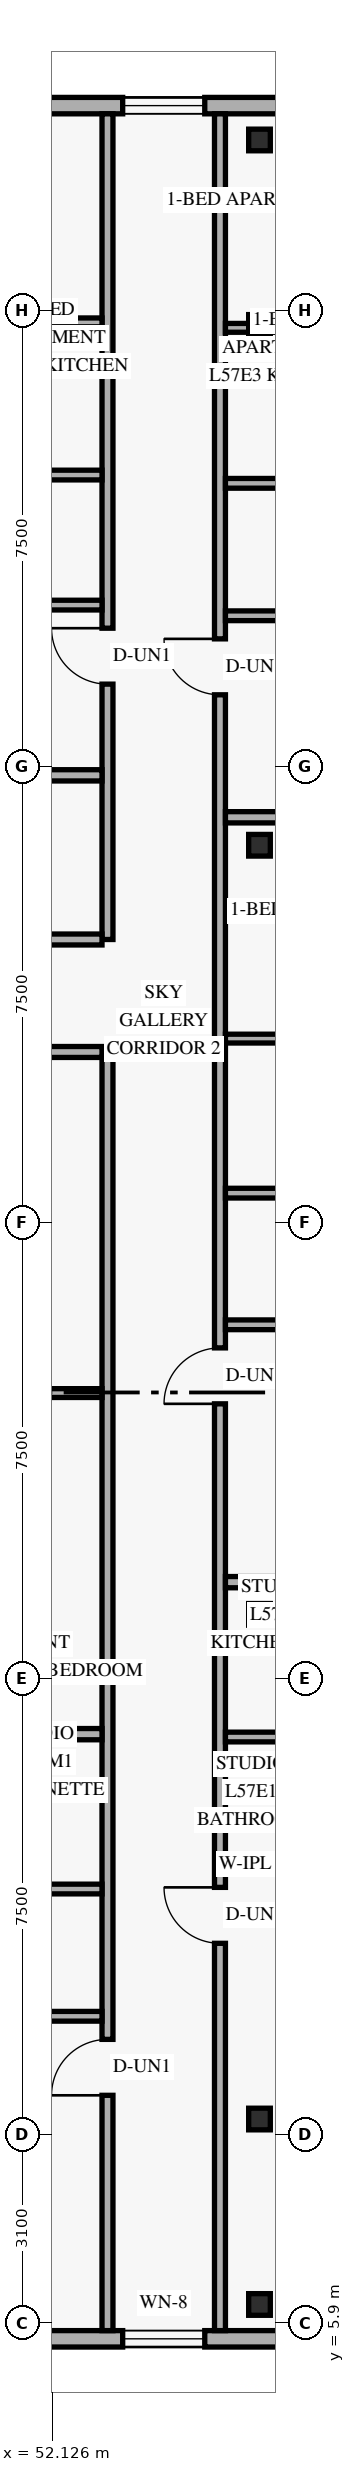
"""IFC4 building model, lengths in metres.
Left out: names, types, materials, properties, quantities, classifications, styles, units other than length and angle.
Written with IfcOpenShell. Run it as: python <this file> out.ifc"""

import sys

from ifc_helpers import new_model, si_unit, direction, frame, frame_2d, origin, origin_2d, place, context, subcontext, project, spatial, rectangle, hollow_rectangle, extrude, element, fill, save


model = new_model("IFC4")
c1 = context("Model", 3, precision=1e-05, world=origin(), true_north=direction((0.0, 1.0)))
c2 = subcontext(c1, "Body", "Model", "MODEL_VIEW")
j1 = project(units=[si_unit("LENGTHUNIT", "METRE"), si_unit("PLANEANGLEUNIT", "RADIAN")], contexts=[c1])
p1 = place(None, origin())
s1 = spatial("IfcSite", under=j1, at=p1, CompositionType="ELEMENT")
p2 = place(p1, origin())
s2 = spatial("IfcBuilding", under=s1, at=p2, CompositionType="ELEMENT")
p3 = place(p2, frame((0.0, 0.0, 220.2)))
s3 = spatial("IfcBuildingStorey", under=s2, at=p3, CompositionType="ELEMENT", Elevation=220.2)
for number, where, z_axis, x_axis in (
    (1, (55.428, 6.2, 0.0), (0.058, 0.0, 0.998), (0.0, 1.0, 0.0)),
    (2, (55.428, 9.25, 0.0), (0.058, 0.0, 0.998), (0.0, 1.0, 0.0)),
    (3, (55.428, 17.55, 0.0), (0.058, 0.0, 0.998), (0.0, 1.0, 0.0)),
    (4, (55.428, 30.2, 0.0), (0.058, 0.0, 0.998), (0.0, 1.0, 0.0)),
    (5, (55.428, 38.75, 0.0), (0.058, 0.0, 0.998), (0.0, 1.0, 0.0)),
    (6, (55.428, 41.8, 0.0), (0.058, 0.0, 0.998), (0.0, 1.0, 0.0)),
):
    element("IfcColumn", number, at=place(p3, frame(where, z_axis=z_axis, x_axis=x_axis)), inside=s3, PredefinedType="COLUMN", context=c2, shape_type="SweptSolid", body=[
        extrude(hollow_rectangle(XDim=0.356, YDim=0.356, WallThickness=0.016, at=origin_2d()), origin(), (0.0, 0.0, 1.0), 3.606),
    ])
p4 = place(p3, frame((25.82, 5.635, 0.0), z_axis=(0.0, 0.0, 1.0), x_axis=(1.0, 0.0, 0.0)))
e7 = element("IfcWall", 7, at=p4, inside=s3, PredefinedType="SOLIDWALL", context=c2, shape_type="SweptSolid", body=[
    extrude(rectangle(XDim=32.96, YDim=0.27, at=frame_2d((16.48, 0.0))), origin(), (0.0, 0.0, 1.0), 3.36),
])
p5 = place(p4, frame((3.795, 0.0, 0.85)))
e8 = element("IfcOpeningElement", 8, at=p5, cuts=e7, PredefinedType="OPENING", context=c2, shape_type="SweptSolid", body=[
    extrude(rectangle(XDim=1.35, YDim=1.55, at=frame_2d((0.675, 0.775))), frame((0.0, 0.145, 0.0), z_axis=(0.0, -1.0, 0.0), x_axis=(1.0, 0.0, 0.0)), (0.0, 0.0, 1.0), 0.29),
])
p6 = place(p4, frame((16.313, 0.0, 0.85)))
e9 = element("IfcOpeningElement", 9, at=p6, cuts=e7, PredefinedType="OPENING", context=c2, shape_type="SweptSolid", body=[
    extrude(rectangle(XDim=1.35, YDim=1.55, at=frame_2d((0.675, 0.775))), frame((0.0, 0.145, 0.0), z_axis=(0.0, -1.0, 0.0), x_axis=(1.0, 0.0, 0.0)), (0.0, 0.0, 1.0), 0.29),
])
p7 = place(p4, frame((27.463, 0.0, 0.85)))
e10 = element("IfcOpeningElement", 10, at=p7, cuts=e7, PredefinedType="OPENING", context=c2, shape_type="SweptSolid", body=[
    extrude(rectangle(XDim=1.35, YDim=1.55, at=frame_2d((0.675, 0.775))), frame((0.0, 0.145, 0.0), z_axis=(0.0, -1.0, 0.0), x_axis=(1.0, 0.0, 0.0)), (0.0, 0.0, 1.0), 0.29),
])
p8 = place(p4, frame((30.881, 0.0, 0.85)))
e11 = element("IfcOpeningElement", 11, at=p8, cuts=e7, PredefinedType="OPENING", context=c2, shape_type="SweptSolid", body=[
    extrude(rectangle(XDim=1.35, YDim=1.55, at=frame_2d((0.675, 0.775))), frame((0.0, 0.145, 0.0), z_axis=(0.0, -1.0, 0.0), x_axis=(1.0, 0.0, 0.0)), (0.0, 0.0, 1.0), 0.29),
])
p9 = place(p3, frame((58.78, 42.365, 0.0), z_axis=(0.0, 0.0, 1.0), x_axis=(-1.0, 0.0, 0.0)))
e12 = element("IfcWall", 12, at=p9, inside=s3, PredefinedType="SOLIDWALL", context=c2, shape_type="SweptSolid", body=[
    extrude(rectangle(XDim=32.96, YDim=0.27, at=frame_2d((16.48, 0.0))), origin(), (0.0, 0.0, 1.0), 3.36),
])
p10 = place(p9, frame((27.815, 0.0, 0.85)))
e13 = element("IfcOpeningElement", 13, at=p10, cuts=e12, PredefinedType="OPENING", context=c2, shape_type="SweptSolid", body=[
    extrude(rectangle(XDim=1.35, YDim=1.55, at=frame_2d((0.675, 0.775))), frame((0.0, 0.145, 0.0), z_axis=(0.0, -1.0, 0.0), x_axis=(1.0, 0.0, 0.0)), (0.0, 0.0, 1.0), 0.29),
])
p11 = place(p9, frame((15.022, 0.0, 0.85)))
e14 = element("IfcOpeningElement", 14, at=p11, cuts=e12, PredefinedType="OPENING", context=c2, shape_type="SweptSolid", body=[
    extrude(rectangle(XDim=1.35, YDim=1.55, at=frame_2d((0.675, 0.775))), frame((0.0, 0.145, 0.0), z_axis=(0.0, -1.0, 0.0), x_axis=(1.0, 0.0, 0.0)), (0.0, 0.0, 1.0), 0.29),
])
p12 = place(p9, frame((4.147, 0.0, 0.85)))
e15 = element("IfcOpeningElement", 15, at=p12, cuts=e12, PredefinedType="OPENING", context=c2, shape_type="SweptSolid", body=[
    extrude(rectangle(XDim=1.35, YDim=1.55, at=frame_2d((0.675, 0.775))), frame((0.0, 0.145, 0.0), z_axis=(0.0, -1.0, 0.0), x_axis=(1.0, 0.0, 0.0)), (0.0, 0.0, 1.0), 0.29),
])
p13 = place(p9, frame((0.729, 0.0, 0.85)))
e16 = element("IfcOpeningElement", 16, at=p13, cuts=e12, PredefinedType="OPENING", context=c2, shape_type="SweptSolid", body=[
    extrude(rectangle(XDim=1.35, YDim=1.55, at=frame_2d((0.675, 0.775))), frame((0.0, 0.145, 0.0), z_axis=(0.0, -1.0, 0.0), x_axis=(1.0, 0.0, 0.0)), (0.0, 0.0, 1.0), 0.29),
])
p14 = place(p3, frame((53.033, 5.77, 0.0), z_axis=(0.0, 0.0, 1.0), x_axis=(0.0, 1.0, 0.0)))
e17 = element("IfcWall", 17, at=p14, inside=s3, PredefinedType="STANDARD", context=c2, shape_type="SweptSolid", body=[
    extrude(rectangle(XDim=21.03, YDim=0.18, at=frame_2d((10.515, 0.0))), origin(), (0.0, 0.0, 1.0), 2.803),
])
p15 = place(p14, frame((3.87, 0.0, 0.0)))
e18 = element("IfcOpeningElement", 18, at=p15, cuts=e17, PredefinedType="OPENING", context=c2, shape_type="SweptSolid", body=[
    extrude(rectangle(XDim=0.92, YDim=2.15, at=frame_2d((0.46, 1.075))), frame((0.0, 0.1, 0.0), z_axis=(0.0, -1.0, 0.0), x_axis=(1.0, 0.0, 0.0)), (0.0, 0.0, 1.0), 0.2),
])
p16 = place(p3, frame((53.033, 28.65, 0.0), z_axis=(0.0, 0.0, 1.0), x_axis=(0.0, 1.0, 0.0)))
e19 = element("IfcWall", 19, at=p16, inside=s3, PredefinedType="STANDARD", context=c2, shape_type="SweptSolid", body=[
    extrude(rectangle(XDim=13.58, YDim=0.18, at=frame_2d((6.79, 0.0))), origin(), (0.0, 0.0, 1.0), 2.803),
])
p17 = place(p16, frame((4.2, 0.0, 0.0)))
e20 = element("IfcOpeningElement", 20, at=p17, cuts=e19, PredefinedType="OPENING", context=c2, shape_type="SweptSolid", body=[
    extrude(rectangle(XDim=0.92, YDim=2.15, at=frame_2d((0.46, 1.075))), frame((0.0, 0.1, 0.0), z_axis=(0.0, -1.0, 0.0), x_axis=(1.0, 0.0, 0.0)), (0.0, 0.0, 1.0), 0.2),
])
p18 = place(p3, frame((37.64, 26.8, 0.0), z_axis=(0.0, 0.0, 1.0), x_axis=(1.0, 0.0, 0.0)))
e21 = element("IfcWall", 21, at=p18, inside=s3, PredefinedType="STANDARD", context=c2, shape_type="SweptSolid", body=[
    extrude(rectangle(XDim=15.303, YDim=0.18, at=frame_2d((7.651, 0.0))), origin(), (0.0, 0.0, 1.0), 2.803),
])
p19 = place(p18, frame((0.32, 0.0, 0.0)))
e22 = element("IfcOpeningElement", 22, at=p19, cuts=e21, PredefinedType="OPENING", context=c2, shape_type="SweptSolid", body=[
    extrude(rectangle(XDim=0.92, YDim=2.15, at=frame_2d((0.46, 1.075))), frame((0.0, 0.1, 0.0), z_axis=(0.0, -1.0, 0.0), x_axis=(1.0, 0.0, 0.0)), (0.0, 0.0, 1.0), 0.2),
])
p20 = place(p3, frame((37.64, 28.65, 0.0), z_axis=(0.0, 0.0, 1.0), x_axis=(1.0, 0.0, 0.0)))
e23 = element("IfcWall", 23, at=p20, inside=s3, PredefinedType="STANDARD", context=c2, shape_type="SweptSolid", body=[
    extrude(rectangle(XDim=15.303, YDim=0.18, at=frame_2d((7.651, 0.0))), origin(), (0.0, 0.0, 1.0), 2.803),
])
p21 = place(p3, frame((54.883, 5.77, 0.0), z_axis=(0.0, 0.0, 1.0), x_axis=(0.0, 1.0, 0.0)))
e24 = element("IfcWall", 24, at=p21, inside=s3, PredefinedType="STANDARD", context=c2, shape_type="SweptSolid", body=[
    extrude(rectangle(XDim=36.46, YDim=0.18, at=frame_2d((18.23, 0.0))), origin(), (0.0, 0.0, 1.0), 2.803),
])
p22 = place(p21, frame((6.37, 0.0, 0.0)))
e25 = element("IfcOpeningElement", 25, at=p22, cuts=e24, PredefinedType="OPENING", context=c2, shape_type="SweptSolid", body=[
    extrude(rectangle(XDim=0.92, YDim=2.15, at=frame_2d((0.46, 1.075))), frame((0.0, 0.1, 0.0), z_axis=(0.0, -1.0, 0.0), x_axis=(1.0, 0.0, 0.0)), (0.0, 0.0, 1.0), 0.2),
])
p23 = place(p21, frame((15.243, 0.0, 0.0)))
e26 = element("IfcOpeningElement", 26, at=p23, cuts=e24, PredefinedType="OPENING", context=c2, shape_type="SweptSolid", body=[
    extrude(rectangle(XDim=0.92, YDim=2.15, at=frame_2d((0.46, 1.075))), frame((0.0, 0.1, 0.0), z_axis=(0.0, -1.0, 0.0), x_axis=(1.0, 0.0, 0.0)), (0.0, 0.0, 1.0), 0.2),
])
p24 = place(p21, frame((26.905, 0.0, 0.0)))
e27 = element("IfcOpeningElement", 27, at=p24, cuts=e24, PredefinedType="OPENING", context=c2, shape_type="SweptSolid", body=[
    extrude(rectangle(XDim=0.92, YDim=2.15, at=frame_2d((0.46, 1.075))), frame((0.0, 0.1, 0.0), z_axis=(0.0, -1.0, 0.0), x_axis=(1.0, 0.0, 0.0)), (0.0, 0.0, 1.0), 0.2),
])
p25 = place(p3, frame((54.973, 13.44, 0.0), z_axis=(0.0, 0.0, 1.0), x_axis=(1.0, 0.0, 0.0)))
e28 = element("IfcWall", 28, at=p25, inside=s3, PredefinedType="PLUMBINGWALL", context=c2, shape_type="SweptSolid", body=[
    extrude(rectangle(XDim=2.606, YDim=0.16, at=frame_2d((1.303, 0.0))), origin(), (0.0, 0.0, 1.0), 2.879),
])
p26 = place(p3, frame((54.973, 15.533, 0.0), z_axis=(0.0, 0.0, 1.0), x_axis=(1.0, 0.0, 0.0)))
e29 = element("IfcWall", 29, at=p26, inside=s3, PredefinedType="PLUMBINGWALL", context=c2, shape_type="SweptSolid", body=[
    extrude(rectangle(XDim=2.446, YDim=0.16, at=frame_2d((1.223, 0.0))), origin(), (0.0, 0.0, 1.0), 2.879),
])
p27 = place(p3, frame((54.973, 18.08, 0.0), z_axis=(0.0, 0.0, 1.0), x_axis=(1.0, 0.0, 0.0)))
e30 = element("IfcWall", 30, at=p27, inside=s3, PredefinedType="PARTITIONING", context=c2, shape_type="SweptSolid", body=[
    extrude(rectangle(XDim=7.157, YDim=0.185, at=frame_2d((3.579, 0.0))), origin(), (0.0, 0.0, 1.0), 2.879),
])
p28 = place(p3, frame((54.973, 27.02, 0.0), z_axis=(0.0, 0.0, 1.0), x_axis=(1.0, 0.0, 0.0)))
e31 = element("IfcWall", 31, at=p28, inside=s3, PredefinedType="PARTITIONING", context=c2, shape_type="SweptSolid", body=[
    extrude(rectangle(XDim=7.157, YDim=0.145, at=frame_2d((3.579, 0.0))), origin(), (0.0, 0.0, 1.0), 2.879),
])
p29 = place(p28, frame((4.594, 0.0, 0.0)))
e32 = element("IfcOpeningElement", 32, at=p29, cuts=e31, PredefinedType="OPENING", context=c2, shape_type="SweptSolid", body=[
    extrude(rectangle(XDim=0.9, YDim=2.14, at=frame_2d((0.45, 1.07))), frame((0.0, 0.083, 0.0), z_axis=(0.0, -1.0, 0.0), x_axis=(1.0, 0.0, 0.0)), (0.0, 0.0, 1.0), 0.165),
])
p30 = place(p3, frame((54.973, 22.313, 0.0), z_axis=(0.0, 0.0, 1.0), x_axis=(1.0, 0.0, 0.0)))
e33 = element("IfcWall", 33, at=p30, inside=s3, PredefinedType="PLUMBINGWALL", context=c2, shape_type="SweptSolid", body=[
    extrude(rectangle(XDim=2.712, YDim=0.16, at=frame_2d((1.356, 0.0))), origin(), (0.0, 0.0, 1.0), 2.879),
])
p31 = place(p3, frame((54.973, 24.478, 0.0), z_axis=(0.0, 0.0, 1.0), x_axis=(1.0, 0.0, 0.0)))
e34 = element("IfcWall", 34, at=p31, inside=s3, PredefinedType="PLUMBINGWALL", context=c2, shape_type="SweptSolid", body=[
    extrude(rectangle(XDim=2.552, YDim=0.16, at=frame_2d((1.276, 0.0))), origin(), (0.0, 0.0, 1.0), 2.879),
])
p32 = place(p3, frame((54.973, 30.66, 0.0), z_axis=(0.0, 0.0, 1.0), x_axis=(1.0, 0.0, 0.0)))
e35 = element("IfcWall", 35, at=p32, inside=s3, PredefinedType="PARTITIONING", context=c2, shape_type="SweptSolid", body=[
    extrude(rectangle(XDim=7.157, YDim=0.185, at=frame_2d((3.579, 0.0))), origin(), (0.0, 0.0, 1.0), 2.879),
])
p33 = place(p3, frame((54.973, 38.71, 0.0), z_axis=(0.0, 0.0, 1.0), x_axis=(1.0, 0.0, 0.0)))
e36 = element("IfcWall", 36, at=p33, inside=s3, PredefinedType="PARTITIONING", context=c2, shape_type="SweptSolid", body=[
    extrude(rectangle(XDim=7.157, YDim=0.145, at=frame_2d((3.579, 0.0))), origin(), (0.0, 0.0, 1.0), 2.803),
])
p34 = place(p33, frame((4.633, 0.0, 0.0)))
e37 = element("IfcOpeningElement", 37, at=p34, cuts=e36, PredefinedType="OPENING", context=c2, shape_type="SweptSolid", body=[
    extrude(rectangle(XDim=0.9, YDim=2.14, at=frame_2d((0.45, 1.07))), frame((0.0, 0.083, 0.0), z_axis=(0.0, -1.0, 0.0), x_axis=(1.0, 0.0, 0.0)), (0.0, 0.0, 1.0), 0.165),
])
p35 = place(p3, frame((54.973, 33.975, 0.0), z_axis=(0.0, 0.0, 1.0), x_axis=(1.0, 0.0, 0.0)))
e38 = element("IfcWall", 38, at=p35, inside=s3, PredefinedType="PLUMBINGWALL", context=c2, shape_type="SweptSolid", body=[
    extrude(rectangle(XDim=2.788, YDim=0.16, at=frame_2d((1.394, 0.0))), origin(), (0.0, 0.0, 1.0), 2.879),
])
p36 = place(p3, frame((54.973, 36.153, 0.0), z_axis=(0.0, 0.0, 1.0), x_axis=(1.0, 0.0, 0.0)))
e39 = element("IfcWall", 39, at=p36, inside=s3, PredefinedType="PLUMBINGWALL", context=c2, shape_type="SweptSolid", body=[
    extrude(rectangle(XDim=2.628, YDim=0.16, at=frame_2d((1.314, 0.0))), origin(), (0.0, 0.0, 1.0), 2.879),
])
p37 = place(p3, frame((38.423, 15.58, 0.0), z_axis=(0.0, 0.0, 1.0), x_axis=(1.0, 0.0, 0.0)))
e40 = element("IfcWall", 40, at=p37, inside=s3, PredefinedType="PARTITIONING", context=c2, shape_type="SweptSolid", body=[
    extrude(rectangle(XDim=14.52, YDim=0.185, at=frame_2d((7.26, 0.0))), origin(), (0.0, 0.0, 1.0), 2.803),
])
p38 = place(p3, frame((50.109, 10.94, 0.0), z_axis=(0.0, 0.0, 1.0), x_axis=(1.0, 0.0, 0.0)))
e41 = element("IfcWall", 41, at=p38, inside=s3, PredefinedType="PLUMBINGWALL", context=c2, shape_type="SweptSolid", body=[
    extrude(rectangle(XDim=2.834, YDim=0.16, at=frame_2d((1.417, 0.0))), origin(), (0.0, 0.0, 1.0), 3.36),
])
p39 = place(p3, frame((50.269, 13.033, 0.0), z_axis=(0.0, 0.0, 1.0), x_axis=(1.0, 0.0, 0.0)))
e42 = element("IfcWall", 42, at=p39, inside=s3, PredefinedType="PLUMBINGWALL", context=c2, shape_type="SweptSolid", body=[
    extrude(rectangle(XDim=2.674, YDim=0.16, at=frame_2d((1.337, 0.0))), origin(), (0.0, 0.0, 1.0), 3.36),
])
p40 = place(p3, frame((49.723, 21.19, 0.0), z_axis=(0.0, 0.0, 1.0), x_axis=(1.0, 0.0, 0.0)))
e43 = element("IfcWall", 43, at=p40, inside=s3, PredefinedType="PARTITIONING", context=c2, shape_type="SweptSolid", body=[
    extrude(rectangle(XDim=3.22, YDim=0.145, at=frame_2d((1.61, 0.0))), origin(), (0.0, 0.0, 1.0), 3.36),
])
p41 = place(p3, frame((38.972, 31.35, 0.0), z_axis=(0.0, 0.0, 1.0), x_axis=(1.0, 0.0, 0.0)))
e44 = element("IfcWall", 44, at=p41, inside=s3, PredefinedType="PARTITIONING", context=c2, shape_type="SweptSolid", body=[
    extrude(rectangle(XDim=13.97, YDim=0.185, at=frame_2d((6.985, 0.0))), origin(), (0.0, 0.0, 1.0), 2.803),
])
p42 = place(p3, frame((38.51, 38.8, 0.0), z_axis=(0.0, 0.0, 1.0), x_axis=(1.0, 0.0, 0.0)))
e45 = element("IfcWall", 45, at=p42, inside=s3, PredefinedType="PARTITIONING", context=c2, shape_type="SweptSolid", body=[
    extrude(rectangle(XDim=14.433, YDim=0.145, at=frame_2d((7.216, 0.0))), origin(), (0.0, 0.0, 1.0), 2.803),
])
p43 = place(p42, frame((7.273, 0.0, 0.0)))
e46 = element("IfcOpeningElement", 46, at=p43, cuts=e45, PredefinedType="OPENING", context=c2, shape_type="SweptSolid", body=[
    extrude(rectangle(XDim=0.9, YDim=2.14, at=frame_2d((0.45, 1.07))), frame((0.0, 0.083, 0.0), z_axis=(0.0, -1.0, 0.0), x_axis=(1.0, 0.0, 0.0)), (0.0, 0.0, 1.0), 0.165),
])
p44 = place(p3, frame((50.383, 34.15, 0.0), z_axis=(0.0, 0.0, 1.0), x_axis=(1.0, 0.0, 0.0)))
e47 = element("IfcWall", 47, at=p44, inside=s3, PredefinedType="PLUMBINGWALL", context=c2, shape_type="SweptSolid", body=[
    extrude(rectangle(XDim=2.56, YDim=0.16, at=frame_2d((1.28, 0.0))), origin(), (0.0, 0.0, 1.0), 3.36),
])
p45 = place(p3, frame((50.543, 36.289, 0.0), z_axis=(0.0, 0.0, 1.0), x_axis=(1.0, 0.0, 0.0)))
e48 = element("IfcWall", 48, at=p45, inside=s3, PredefinedType="PLUMBINGWALL", context=c2, shape_type="SweptSolid", body=[
    extrude(rectangle(XDim=2.4, YDim=0.16, at=frame_2d((1.2, 0.0))), origin(), (0.0, 0.0, 1.0), 3.36),
])
p46 = place(p7, origin())
e49 = element("IfcWindow", 49, at=p46, inside=s3, PartitioningType="SINGLE_PANEL", PredefinedType="WINDOW", context=c2, shape_type="SweptSolid", body=[
    extrude(rectangle(XDim=1.35, YDim=1.55, at=frame_2d((0.675, 0.775))), frame((0.0, 0.03, 0.0), z_axis=(0.0, -1.0, 0.0), x_axis=(1.0, 0.0, 0.0)), (0.0, 0.0, 1.0), 0.06),
])
fill(e10, e49)
p47 = place(p12, origin())
e50 = element("IfcWindow", 50, at=p47, inside=s3, PartitioningType="SINGLE_PANEL", PredefinedType="WINDOW", context=c2, shape_type="SweptSolid", body=[
    extrude(rectangle(XDim=1.35, YDim=1.55, at=frame_2d((0.675, 0.775))), frame((0.0, 0.03, 0.0), z_axis=(0.0, -1.0, 0.0), x_axis=(1.0, 0.0, 0.0)), (0.0, 0.0, 1.0), 0.06),
])
fill(e15, e50)
p48 = place(p22, origin())
e51 = element("IfcDoor", 51, at=p48, inside=s3, OperationType="SINGLE_SWING_RIGHT", PredefinedType="DOOR", context=c2, shape_type="SweptSolid", body=[
    extrude(rectangle(XDim=0.92, YDim=2.15, at=frame_2d((0.46, 1.075))), frame((0.0, 0.025, 0.0), z_axis=(0.0, -1.0, 0.0), x_axis=(1.0, 0.0, 0.0)), (0.0, 0.0, 1.0), 0.05),
])
fill(e25, e51)
p49 = place(p23, origin())
e52 = element("IfcDoor", 52, at=p49, inside=s3, OperationType="SINGLE_SWING_LEFT", PredefinedType="DOOR", context=c2, shape_type="SweptSolid", body=[
    extrude(rectangle(XDim=0.92, YDim=2.15, at=frame_2d((0.46, 1.075))), frame((0.0, 0.025, 0.0), z_axis=(0.0, -1.0, 0.0), x_axis=(1.0, 0.0, 0.0)), (0.0, 0.0, 1.0), 0.05),
])
fill(e26, e52)
p50 = place(p24, origin())
e53 = element("IfcDoor", 53, at=p50, inside=s3, OperationType="SINGLE_SWING_RIGHT", PredefinedType="DOOR", context=c2, shape_type="SweptSolid", body=[
    extrude(rectangle(XDim=0.92, YDim=2.15, at=frame_2d((0.46, 1.075))), frame((0.0, 0.025, 0.0), z_axis=(0.0, -1.0, 0.0), x_axis=(1.0, 0.0, 0.0)), (0.0, 0.0, 1.0), 0.05),
])
fill(e27, e53)
p51 = place(p15, origin())
e54 = element("IfcDoor", 54, at=p51, inside=s3, OperationType="SINGLE_SWING_LEFT", PredefinedType="DOOR", context=c2, shape_type="SweptSolid", body=[
    extrude(rectangle(XDim=0.92, YDim=2.15, at=frame_2d((0.46, 1.075))), frame((0.0, 0.025, 0.0), z_axis=(0.0, -1.0, 0.0), x_axis=(1.0, 0.0, 0.0)), (0.0, 0.0, 1.0), 0.05),
])
fill(e18, e54)
p52 = place(p17, origin())
e55 = element("IfcDoor", 55, at=p52, inside=s3, OperationType="SINGLE_SWING_RIGHT", PredefinedType="DOOR", context=c2, shape_type="SweptSolid", body=[
    extrude(rectangle(XDim=0.92, YDim=2.15, at=frame_2d((0.46, 1.075))), frame((0.0, 0.025, 0.0), z_axis=(0.0, -1.0, 0.0), x_axis=(1.0, 0.0, 0.0)), (0.0, 0.0, 1.0), 0.05),
])
fill(e20, e55)
save(model, sys.argv[1])
